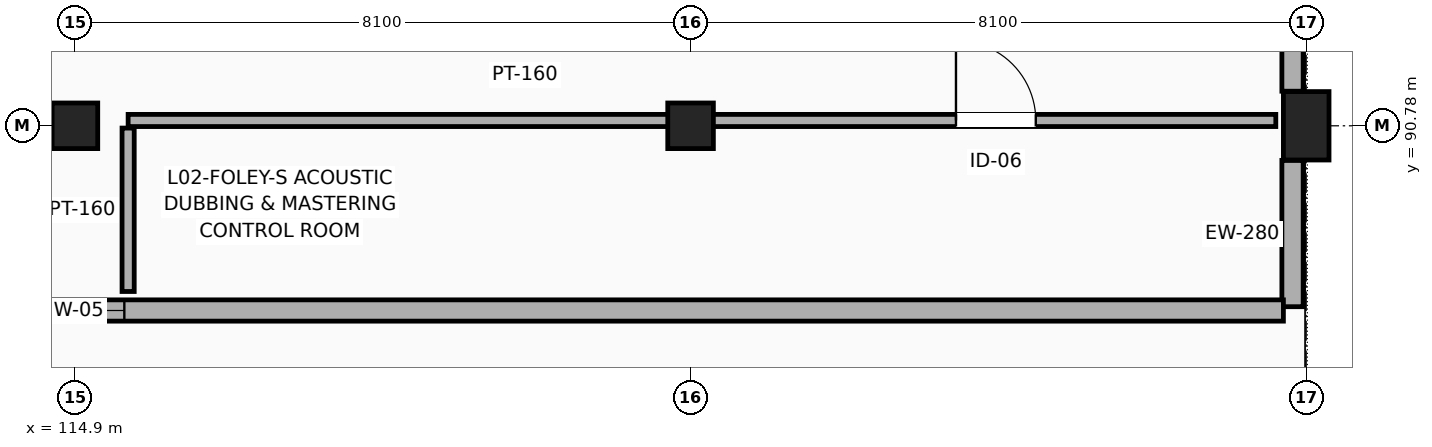
"""IFC4 building model, lengths in metres.
Left out: names, types, materials, properties, quantities, classifications, styles, units other than length and angle.
Written with IfcOpenShell. Run it as: python <this file> out.ifc"""

import sys

from ifc_helpers import new_model, si_unit, direction, frame, frame_2d, origin, origin_2d, place, context, subcontext, project, spatial, rectangle, extrude, element, fill, save


model = new_model("IFC4")
c1 = context("Model", 3, precision=1e-05, world=origin(), true_north=direction((0.0, 1.0)))
c2 = subcontext(c1, "Body", "Model", "MODEL_VIEW")
j1 = project(units=[si_unit("LENGTHUNIT", "METRE"), si_unit("PLANEANGLEUNIT", "RADIAN")], contexts=[c1])
p1 = place(None, origin())
s1 = spatial("IfcSite", under=j1, at=p1, CompositionType="ELEMENT")
p2 = place(p1, origin())
s2 = spatial("IfcBuilding", under=s1, at=p2, CompositionType="ELEMENT")
p3 = place(p2, frame((0.0, 0.0, 10.2)))
s3 = spatial("IfcBuildingStorey", under=s2, at=p3, CompositionType="ELEMENT", Elevation=10.2)
for number, where, z_axis, x_axis in (
    (1, (114.9, 90.78, 0.0), (0.0, 0.0, 1.0), (1.0, 0.0, 0.0)),
    (2, (123.0, 90.78, 0.0), (0.0, 0.0, 1.0), (1.0, 0.0, 0.0)),
):
    element("IfcColumn", number, at=place(p3, frame(where, z_axis=z_axis, x_axis=x_axis)), inside=s3, PredefinedType="COLUMN", context=c2, shape_type="SweptSolid", body=[
        extrude(rectangle(XDim=0.6, YDim=0.6, at=origin_2d()), origin(), (0.0, 0.0, 1.0), 4.5),
    ])
p4 = place(p3, frame((131.1, 90.78, 0.0), z_axis=(0.0, 0.0, 1.0), x_axis=(1.0, 0.0, 0.0)))
e3 = element("IfcColumn", 3, at=p4, inside=s3, PredefinedType="COLUMN", context=c2, shape_type="SweptSolid", body=[
    extrude(rectangle(XDim=0.6, YDim=0.9, at=origin_2d()), origin(), (0.0, 0.0, 1.0), 4.5),
])
p5 = place(p3, frame((130.92, 88.4, 0.0), z_axis=(0.0, 0.0, 1.0), x_axis=(0.0, 1.0, 0.0)))
e4 = element("IfcWall", 4, at=p5, inside=s3, PredefinedType="SOLIDWALL", context=c2, shape_type="SweptSolid", body=[
    extrude(rectangle(XDim=1.925, YDim=0.28, at=frame_2d((0.962, 0.0))), origin(), (0.0, 0.0, 1.0), 3.607),
])
p6 = place(p3, frame((130.92, 91.235, 0.0), z_axis=(0.0, 0.0, 1.0), x_axis=(0.0, 1.0, 0.0)))
e5 = element("IfcWall", 5, at=p6, inside=s3, PredefinedType="SOLIDWALL", context=c2, shape_type="SweptSolid", body=[
    extrude(rectangle(XDim=6.53, YDim=0.28, at=frame_2d((3.265, 0.0))), origin(), (0.0, 0.0, 1.0), 3.557),
])
p7 = place(p3, frame((99.1, 88.35, 0.0), z_axis=(0.0, 0.0, 1.0), x_axis=(1.0, 0.0, 0.0)))
e6 = element("IfcWall", 6, at=p7, inside=s3, PredefinedType="SOLIDWALL", context=c2, shape_type="SweptSolid", body=[
    extrude(rectangle(XDim=31.7, YDim=0.28, at=frame_2d((15.85, 0.0))), origin(), (0.0, 0.0, 1.0), 3.607),
])
p8 = place(p7, frame((15.25, 0.0, 0.95)))
e7 = element("IfcOpeningElement", 7, at=p8, cuts=e6, PredefinedType="OPENING", context=c2, shape_type="SweptSolid", body=[
    extrude(rectangle(XDim=1.2, YDim=1.8, at=frame_2d((0.6, 0.9))), frame((0.0, 0.15, 0.0), z_axis=(0.0, -1.0, 0.0), x_axis=(1.0, 0.0, 0.0)), (0.0, 0.0, 1.0), 0.3),
])
p9 = place(p3, frame((115.6, 90.85, 0.0), z_axis=(0.0, 0.0, 1.0), x_axis=(1.0, 0.0, 0.0)))
e8 = element("IfcWall", 8, at=p9, inside=s3, PredefinedType="PARTITIONING", context=c2, shape_type="SweptSolid", body=[
    extrude(rectangle(XDim=15.1, YDim=0.16, at=frame_2d((7.55, 0.0))), origin(), (0.0, 0.0, 1.0), 3.407),
])
p10 = place(p9, frame((10.892, 0.0, 0.0)))
e9 = element("IfcOpeningElement", 9, at=p10, cuts=e8, PredefinedType="OPENING", context=c2, shape_type="SweptSolid", body=[
    extrude(rectangle(XDim=1.05, YDim=2.25, at=frame_2d((0.525, 1.125))), frame((0.0, 0.09, 0.0), z_axis=(0.0, -1.0, 0.0), x_axis=(1.0, 0.0, 0.0)), (0.0, 0.0, 1.0), 0.18),
])
p11 = place(p3, frame((115.6, 88.6, 0.0), z_axis=(0.0, 0.0, 1.0), x_axis=(0.0, 1.0, 0.0)))
e10 = element("IfcWall", 10, at=p11, inside=s3, PredefinedType="PARTITIONING", context=c2, shape_type="SweptSolid", body=[
    extrude(rectangle(XDim=2.15, YDim=0.16, at=frame_2d((1.075, 0.0))), origin(), (0.0, 0.0, 1.0), 3.407),
])
p12 = place(p8, origin())
e11 = element("IfcWindow", 11, at=p12, inside=s3, PartitioningType="SINGLE_PANEL", PredefinedType="WINDOW", context=c2, shape_type="SweptSolid", body=[
    extrude(rectangle(XDim=1.2, YDim=1.8, at=frame_2d((0.6, 0.9))), frame((0.0, 0.03, 0.0), z_axis=(0.0, -1.0, 0.0), x_axis=(1.0, 0.0, 0.0)), (0.0, 0.0, 1.0), 0.06),
])
fill(e7, e11)
p13 = place(p10, origin())
e12 = element("IfcDoor", 12, at=p13, inside=s3, OperationType="SINGLE_SWING_LEFT", PredefinedType="DOOR", context=c2, shape_type="SweptSolid", body=[
    extrude(rectangle(XDim=1.05, YDim=2.25, at=frame_2d((0.525, 1.125))), frame((0.0, 0.025, 0.0), z_axis=(0.0, -1.0, 0.0), x_axis=(1.0, 0.0, 0.0)), (0.0, 0.0, 1.0), 0.05),
])
fill(e9, e12)
save(model, sys.argv[1])
